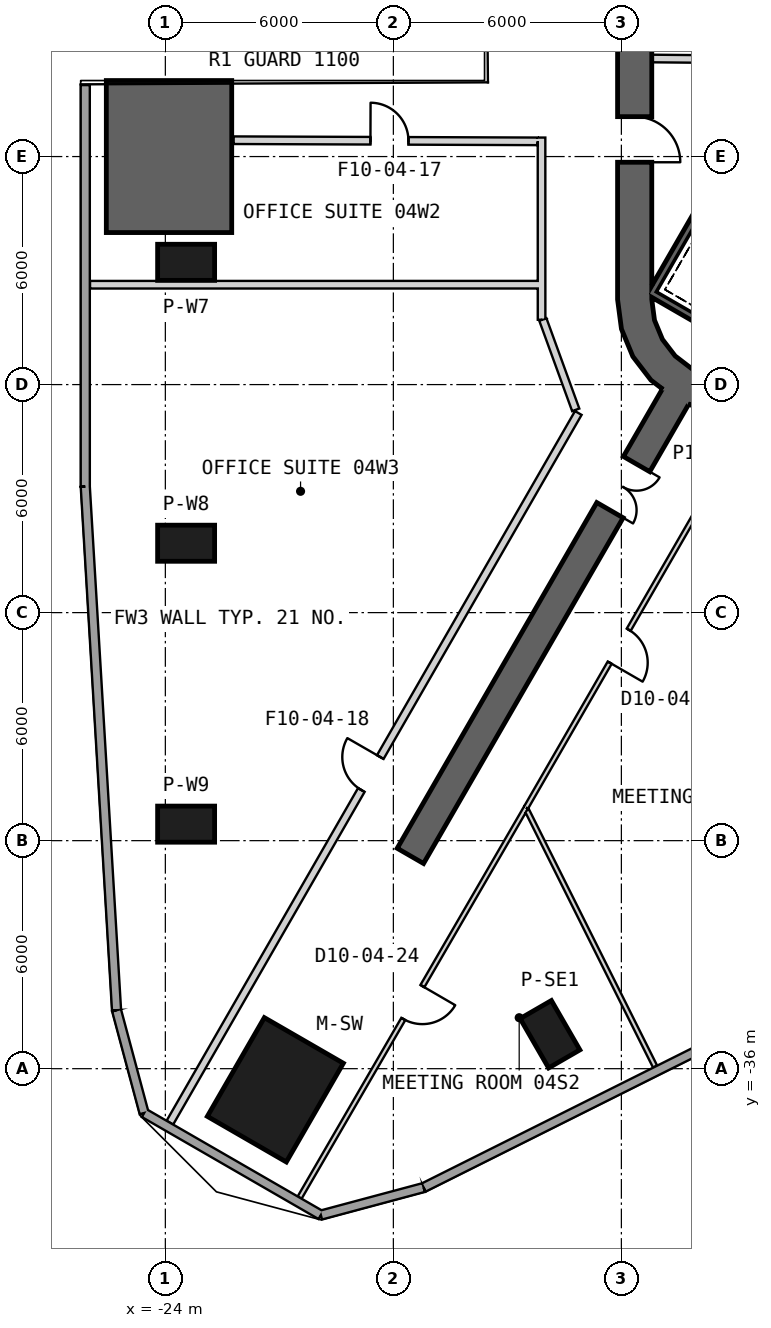
"""IFC4 building model, lengths in metres.
Left out: names, types, materials, properties, quantities, classifications, styles, units other than length and angle.
Written with IfcOpenShell. Run it as: python <this file> out.ifc"""

import sys

from ifc_helpers import new_model, si_unit, direction, frame, frame_2d, origin, origin_2d, place, context, subcontext, project, spatial, polyline, rectangle, outline, extrude, element, fill, save


model = new_model("IFC4")
c1 = context("Model", 3, precision=1e-05, world=origin(), true_north=direction((0.0, 1.0)))
c2 = subcontext(c1, "Body", "Model", "MODEL_VIEW")
j1 = project(units=[si_unit("LENGTHUNIT", "METRE"), si_unit("PLANEANGLEUNIT", "RADIAN")], contexts=[c1])
p1 = place(None, origin())
s1 = spatial("IfcSite", under=j1, at=p1, CompositionType="ELEMENT")
p2 = place(p1, origin())
s2 = spatial("IfcBuilding", under=s1, at=p2, CompositionType="ELEMENT")
p3 = place(p2, frame((0.0, 0.0, 27.5)))
s3 = spatial("IfcBuildingStorey", under=s2, at=p3, CompositionType="ELEMENT", Elevation=27.5)
p4 = place(p3, frame((-21.106, -36.556, 0.0), z_axis=(0.0, 0.0, 1.0), x_axis=(-0.5, -0.866025403784, 0.0)))
e1 = element("IfcColumn", 1, at=p4, inside=s3, PredefinedType="COLUMN", context=c2, shape_type="SweptSolid", body=[
    extrude(rectangle(XDim=3.0, YDim=2.4, at=origin_2d()), origin(), (0.0, 0.0, 1.0), 6.0),
])
for number, where, z_axis, x_axis in (
    (2, (-23.453, -14.783, 0.0), (0.0, 0.0, 1.0), (-1.0, 0.0, 0.0)),
    (3, (-23.453, -22.174, 0.0), (0.0, 0.0, 1.0), (-1.0, 0.0, 0.0)),
    (4, (-23.453, -29.566, 0.0), (0.0, 0.0, 1.0), (-1.0, 0.0, 0.0)),
    (5, (-13.878, -35.094, 0.0), (0.0, 0.0, 1.0), (0.5, -0.866, 0.0)),
):
    element("IfcColumn", number, at=place(p3, frame(where, z_axis=z_axis, x_axis=x_axis)), inside=s3, PredefinedType="COLUMN", context=c2, shape_type="SweptSolid", body=[
        extrude(rectangle(XDim=1.5, YDim=0.95, at=origin_2d()), origin(), (0.0, 0.0, 1.0), 6.0),
    ])
p5 = place(p3, frame((-11.65, 15.762, 0.0), z_axis=(0.0, 0.0, 1.0), x_axis=(0.0, -1.0, 0.0)))
e6 = element("IfcWall", 6, at=p5, inside=s3, PredefinedType="SHEAR", context=c2, shape_type="SweptSolid", body=[
    extrude(rectangle(XDim=31.523, YDim=0.9, at=frame_2d((15.762, 0.0))), origin(), (0.0, 0.0, 1.0), 6.0),
])
p6 = place(p5, frame((7.062, 0.0, 0.0)))
e7 = element("IfcOpeningElement", 7, at=p6, cuts=e6, PredefinedType="OPENING", context=c2, shape_type="SweptSolid", body=[
    extrude(rectangle(XDim=1.2, YDim=2.4, at=frame_2d((0.6, 1.2))), frame((0.0, 0.46, 0.0), z_axis=(0.0, -1.0, 0.0), x_axis=(1.0, 0.0, 0.0)), (0.0, 0.0, 1.0), 0.92),
])
p7 = place(p5, frame((9.762, 0.0, 0.0)))
e8 = element("IfcOpeningElement", 8, at=p7, cuts=e6, PredefinedType="OPENING", context=c2, shape_type="SweptSolid", body=[
    extrude(rectangle(XDim=1.2, YDim=2.4, at=frame_2d((0.6, 1.2))), frame((0.0, 0.46, 0.0), z_axis=(0.0, -1.0, 0.0), x_axis=(1.0, 0.0, 0.0)), (0.0, 0.0, 1.0), 0.92),
])
p8 = place(p5, frame((12.462, 0.0, 0.0)))
e9 = element("IfcOpeningElement", 9, at=p8, cuts=e6, PredefinedType="OPENING", context=c2, shape_type="SweptSolid", body=[
    extrude(rectangle(XDim=1.2, YDim=2.4, at=frame_2d((0.6, 1.2))), frame((0.0, 0.46, 0.0), z_axis=(0.0, -1.0, 0.0), x_axis=(1.0, 0.0, 0.0)), (0.0, 0.0, 1.0), 0.92),
])
p9 = place(p5, frame((15.162, 0.0, 0.0)))
e10 = element("IfcOpeningElement", 10, at=p9, cuts=e6, PredefinedType="OPENING", context=c2, shape_type="SweptSolid", body=[
    extrude(rectangle(XDim=1.2, YDim=2.4, at=frame_2d((0.6, 1.2))), frame((0.0, 0.46, 0.0), z_axis=(0.0, -1.0, 0.0), x_axis=(1.0, 0.0, 0.0)), (0.0, 0.0, 1.0), 0.92),
])
p10 = place(p5, frame((17.862, 0.0, 0.0)))
e11 = element("IfcOpeningElement", 11, at=p10, cuts=e6, PredefinedType="OPENING", context=c2, shape_type="SweptSolid", body=[
    extrude(rectangle(XDim=1.2, YDim=2.4, at=frame_2d((0.6, 1.2))), frame((0.0, 0.46, 0.0), z_axis=(0.0, -1.0, 0.0), x_axis=(1.0, 0.0, 0.0)), (0.0, 0.0, 1.0), 0.92),
])
p11 = place(p5, frame((20.562, 0.0, 0.0)))
e12 = element("IfcOpeningElement", 12, at=p11, cuts=e6, PredefinedType="OPENING", context=c2, shape_type="SweptSolid", body=[
    extrude(rectangle(XDim=1.2, YDim=2.4, at=frame_2d((0.6, 1.2))), frame((0.0, 0.46, 0.0), z_axis=(0.0, -1.0, 0.0), x_axis=(1.0, 0.0, 0.0)), (0.0, 0.0, 1.0), 0.92),
])
p12 = place(p5, frame((23.262, 0.0, 0.0)))
e13 = element("IfcOpeningElement", 13, at=p12, cuts=e6, PredefinedType="OPENING", context=c2, shape_type="SweptSolid", body=[
    extrude(rectangle(XDim=1.2, YDim=2.4, at=frame_2d((0.6, 1.2))), frame((0.0, 0.46, 0.0), z_axis=(0.0, -1.0, 0.0), x_axis=(1.0, 0.0, 0.0)), (0.0, 0.0, 1.0), 0.92),
])
p13 = place(p5, frame((3.612, 0.0, 0.0)))
e14 = element("IfcOpeningElement", 14, at=p13, cuts=e6, PredefinedType="OPENING", context=c2, shape_type="SweptSolid", body=[
    extrude(rectangle(XDim=1.2, YDim=2.4, at=frame_2d((0.6, 1.2))), frame((0.0, 0.46, 0.0), z_axis=(0.0, -1.0, 0.0), x_axis=(1.0, 0.0, 0.0)), (0.0, 0.0, 1.0), 0.92),
])
p14 = place(p5, frame((26.712, 0.0, 0.0)))
e15 = element("IfcOpeningElement", 15, at=p14, cuts=e6, PredefinedType="OPENING", context=c2, shape_type="SweptSolid", body=[
    extrude(rectangle(XDim=1.2, YDim=2.4, at=frame_2d((0.6, 1.2))), frame((0.0, 0.46, 0.0), z_axis=(0.0, -1.0, 0.0), x_axis=(1.0, 0.0, 0.0)), (0.0, 0.0, 1.0), 0.92),
])
p15 = place(p3, origin())
e16 = element("IfcWall", 16, at=p15, inside=s3, PredefinedType="SHEAR", context=c2, shape_type="SweptSolid", body=[
    extrude(outline(polyline([(-12.1, -15.762), (-11.998, -16.538), (-11.698, -17.262), (-11.221, -17.883), (-10.6, -18.36), (-9.876, -18.659), (-9.1, -18.762), (-8.323, -18.659), (-7.6, -18.36), (-8.05, -17.58), (-8.556, -17.79), (-9.1, -17.862), (-9.644, -17.79), (-10.15, -17.58), (-10.585, -17.247), (-10.919, -16.812), (-11.128, -16.305), (-11.2, -15.762), (-12.1, -15.762)])), origin(), (0.0, 0.0, 1.0), 6.0),
])
p16 = place(p3, frame((-10.575, -18.316, 0.0), z_axis=(0.0, 0.0, 1.0), x_axis=(-0.499996575515, -0.866027380903, 0.0)))
e17 = element("IfcWall", 17, at=p16, inside=s3, PredefinedType="SHEAR", context=c2, shape_type="SweptSolid", body=[
    extrude(rectangle(XDim=13.954, YDim=0.8, at=frame_2d((6.977, 0.0))), origin(), (0.0, 0.0, 1.0), 6.0),
])
p17 = place(p16, frame((2.05, 0.0, 0.0)))
e18 = element("IfcOpeningElement", 18, at=p17, cuts=e17, PredefinedType="OPENING", context=c2, shape_type="SweptSolid", body=[
    extrude(rectangle(XDim=1.4, YDim=2.4, at=frame_2d((0.7, 1.2))), frame((0.0, 0.41, 0.0), z_axis=(0.0, -1.0, 0.0), x_axis=(1.0, 0.0, 0.0)), (0.0, 0.0, 1.0), 0.82),
])
p18 = place(p3, origin())
e19 = element("IfcWall", 19, at=p18, inside=s3, PredefinedType="SHEAR", context=c2, shape_type="SweptSolid", body=[
    extrude(outline(polyline([(-25.553, -10.0), (-25.553, -14.0), (-22.253, -14.0), (-22.253, -10.0), (-25.553, -10.0)])), origin(), (0.0, 0.0, 1.0), 6.0),
])
p19 = place(p3, frame((-26.108, -10.119, 0.0), z_axis=(0.0, 0.0, 1.0), x_axis=(6.9319284e-05, -0.999999997597, 0.0)))
e20 = element("IfcWall", 20, at=p19, inside=s3, PredefinedType="SOLIDWALL", context=c2, shape_type="SweptSolid", body=[
    extrude(rectangle(XDim=10.566, YDim=0.24, at=frame_2d((5.283, 0.0))), origin(), (0.0, 0.0, 1.0), 5.7),
])
p20 = place(p3, frame((-26.107, -20.685, 0.0), z_axis=(0.0, 0.0, 1.0), x_axis=(0.059596169304, -0.998222568671, 0.0)))
e21 = element("IfcWall", 21, at=p20, inside=s3, PredefinedType="SOLIDWALL", context=c2, shape_type="SweptSolid", body=[
    extrude(rectangle(XDim=13.801, YDim=0.24, at=frame_2d((6.901, 0.0))), origin(), (0.0, 0.0, 1.0), 5.7),
])
p21 = place(p3, frame((-25.284, -34.462, 0.0), z_axis=(0.0, 0.0, 1.0), x_axis=(0.258850842196, -0.965917305723, 0.0)))
e22 = element("IfcWall", 22, at=p21, inside=s3, PredefinedType="SOLIDWALL", context=c2, shape_type="SweptSolid", body=[
    extrude(rectangle(XDim=2.8, YDim=0.24, at=frame_2d((1.4, 0.0))), origin(), (0.0, 0.0, 1.0), 5.7),
])
p22 = place(p3, frame((-24.56, -37.167, 0.0), z_axis=(0.0, 0.0, 1.0), x_axis=(0.866010734295, -0.500025407441, 0.0)))
e23 = element("IfcWall", 23, at=p22, inside=s3, PredefinedType="SOLIDWALL", context=c2, shape_type="SweptSolid", body=[
    extrude(rectangle(XDim=5.371, YDim=0.24, at=frame_2d((2.686, 0.0))), origin(), (0.0, 0.0, 1.0), 5.7),
])
p23 = place(p3, frame((-19.908, -39.853, 0.0), z_axis=(0.0, 0.0, 1.0), x_axis=(0.965923146675, 0.25882904535, 0.0)))
e24 = element("IfcWall", 24, at=p23, inside=s3, PredefinedType="SOLIDWALL", context=c2, shape_type="SweptSolid", body=[
    extrude(rectangle(XDim=2.801, YDim=0.24, at=frame_2d((1.4, 0.0))), origin(), (0.0, 0.0, 1.0), 5.7),
])
p24 = place(p3, frame((-17.203, -39.128, 0.0), z_axis=(0.0, 0.0, 1.0), x_axis=(0.894377655106, 0.447312653573, 0.0)))
e25 = element("IfcWall", 25, at=p24, inside=s3, PredefinedType="SOLIDWALL", context=c2, shape_type="SweptSolid", body=[
    extrude(rectangle(XDim=13.802, YDim=0.24, at=frame_2d((6.901, 0.0))), origin(), (0.0, 0.0, 1.0), 5.7),
])
p25 = place(p3, frame((-8.05, -9.449, 0.0), z_axis=(0.0, 0.0, 1.0), x_axis=(-0.999957467379, 0.009222983926, 0.0)))
e26 = element("IfcWall", 26, at=p25, inside=s3, PredefinedType="PLUMBINGWALL", context=c2, shape_type="SweptSolid", body=[
    extrude(rectangle(XDim=3.15, YDim=0.2, at=frame_2d((1.575, 0.0))), origin(), (0.0, 0.0, 1.0), 5.7),
])
p26 = place(p3, frame((-11.282, -15.541, -0.3), z_axis=(0.0, 0.0, 1.0), x_axis=(0.866000578957, -0.500042995397, 0.0)))
e27 = element("IfcWall", 27, at=p26, inside=s3, PredefinedType="SHEAR", context=c2, shape_type="SweptSolid", body=[
    extrude(rectangle(XDim=1.89, YDim=0.2, at=frame_2d((0.945, 0.0))), origin(), (0.0, 0.0, 1.0), 6.0),
])
p27 = place(p3, frame((-7.196, -8.663, -0.3), z_axis=(0.0, 0.0, 1.0), x_axis=(-0.499997992926, -0.866026562566, 0.0)))
e28 = element("IfcWall", 28, at=p27, inside=s3, PredefinedType="SHEAR", context=c2, shape_type="SweptSolid", body=[
    extrude(rectangle(XDim=7.9, YDim=0.2, at=frame_2d((3.95, 0.0))), origin(), (0.0, 0.0, 1.0), 6.0),
])
p28 = place(p3, frame((-14.101, -11.5, 0.0), z_axis=(0.0, 0.0, 1.0), x_axis=(0.000254660275, -0.999999967574, 0.0)))
e29 = element("IfcWall", 29, at=p28, inside=s3, PredefinedType="PARTITIONING", context=c2, shape_type="SweptSolid", body=[
    extrude(rectangle(XDim=4.793, YDim=0.2, at=frame_2d((2.397, 0.0))), origin(), (0.0, 0.0, 1.0), 4.88),
])
p29 = place(p3, frame((-22.203, -11.57, 0.0), z_axis=(0.0, 0.0, 1.0), x_axis=(0.999993072975, -0.003722096437, 0.0)))
e30 = element("IfcWall", 30, at=p29, inside=s3, PredefinedType="PARTITIONING", context=c2, shape_type="SweptSolid", body=[
    extrude(rectangle(XDim=8.002, YDim=0.2, at=frame_2d((4.001, 0.0))), origin(), (0.0, 0.0, 1.0), 5.17),
])
p30 = place(p29, frame((3.6, 0.0, 0.0)))
e31 = element("IfcOpeningElement", 31, at=p30, cuts=e30, PredefinedType="OPENING", context=c2, shape_type="SweptSolid", body=[
    extrude(rectangle(XDim=1.0, YDim=2.1, at=frame_2d((0.5, 1.05))), frame((0.0, 0.11, 0.0), z_axis=(0.0, -1.0, 0.0), x_axis=(1.0, 0.0, 0.0)), (0.0, 0.0, 1.0), 0.22),
])
p31 = place(p3, frame((-23.881, -37.42, 0.0), z_axis=(0.0, 0.0, 1.0), x_axis=(0.498838330943, 0.866695055704, 0.0)))
e32 = element("IfcWall", 32, at=p31, inside=s3, PredefinedType="PARTITIONING", context=c2, shape_type="SweptSolid", body=[
    extrude(rectangle(XDim=21.545, YDim=0.2, at=frame_2d((10.772, 0.0))), origin(), (0.0, 0.0, 1.0), 5.7),
])
p32 = place(p31, frame((10.099, 0.0, 0.0)))
e33 = element("IfcOpeningElement", 33, at=p32, cuts=e32, PredefinedType="OPENING", context=c2, shape_type="SweptSolid", body=[
    extrude(rectangle(XDim=1.0, YDim=2.1, at=frame_2d((0.5, 1.05))), frame((0.0, 0.11, 0.0), z_axis=(0.0, -1.0, 0.0), x_axis=(1.0, 0.0, 0.0)), (0.0, 0.0, 1.0), 0.22),
])
p33 = place(p3, frame((-14.066, -16.288, 0.0), z_axis=(0.0, 0.0, 1.0), x_axis=(0.34185155067, -0.939753966368, 0.0)))
e34 = element("IfcWall", 34, at=p33, inside=s3, PredefinedType="PARTITIONING", context=c2, shape_type="SweptSolid", body=[
    extrude(rectangle(XDim=2.53, YDim=0.2, at=frame_2d((1.265, 0.0))), origin(), (0.0, 0.0, 1.0), 4.78),
])
p34 = place(p3, frame((-14.2, -15.372, 0.0), z_axis=(0.0, 0.0, 1.0), x_axis=(-0.999999998068, -6.2161994e-05, 0.0)))
e35 = element("IfcWall", 35, at=p34, inside=s3, PredefinedType="PARTITIONING", context=c2, shape_type="SweptSolid", body=[
    extrude(rectangle(XDim=11.782, YDim=0.2, at=frame_2d((5.891, 0.0))), origin(), (0.0, 0.0, 1.0), 4.88),
])
p35 = place(p3, frame((-14.509, -29.13, 0.0), z_axis=(0.0, 0.0, 1.0), x_axis=(-0.502061062741, -0.864832174054, 0.0)))
e36 = element("IfcWall", 36, at=p35, inside=s3, PredefinedType="PARTITIONING", context=c2, shape_type="SweptSolid", body=[
    extrude(rectangle(XDim=11.866, YDim=0.12, at=frame_2d((5.933, 0.0))), origin(), (0.0, 0.0, 1.0), 5.7),
])
p36 = place(p35, frame((5.432, 0.0, 0.0)))
e37 = element("IfcOpeningElement", 37, at=p36, cuts=e36, PredefinedType="OPENING", context=c2, shape_type="SweptSolid", body=[
    extrude(rectangle(XDim=1.0, YDim=2.1, at=frame_2d((0.5, 1.05))), frame((0.0, 0.07, 0.0), z_axis=(0.0, -1.0, 0.0), x_axis=(1.0, 0.0, 0.0)), (0.0, 0.0, 1.0), 0.14),
])
p37 = place(p3, frame((-9.731, -20.855, 0.0), z_axis=(0.0, 0.0, 1.0), x_axis=(-0.500000422144, -0.866025160059, 0.0)))
e38 = element("IfcWall", 38, at=p37, inside=s3, PredefinedType="PARTITIONING", context=c2, shape_type="SweptSolid", body=[
    extrude(rectangle(XDim=9.554, YDim=0.12, at=frame_2d((4.777, 0.0))), origin(), (0.0, 0.0, 1.0), 5.7),
])
p38 = place(p37, frame((4.152, 0.0, 0.0)))
e39 = element("IfcOpeningElement", 39, at=p38, cuts=e38, PredefinedType="OPENING", context=c2, shape_type="SweptSolid", body=[
    extrude(rectangle(XDim=1.0, YDim=2.1, at=frame_2d((0.5, 1.05))), frame((0.0, 0.07, 0.0), z_axis=(0.0, -1.0, 0.0), x_axis=(1.0, 0.0, 0.0)), (0.0, 0.0, 1.0), 0.14),
])
p39 = place(p3, frame((-14.483, -29.206, 0.0), z_axis=(0.0, 0.0, 1.0), x_axis=(0.447291377977, -0.894388295533, 0.0)))
e40 = element("IfcWall", 40, at=p39, inside=s3, PredefinedType="PARTITIONING", context=c2, shape_type="SweptSolid", body=[
    extrude(rectangle(XDim=7.533, YDim=0.12, at=frame_2d((3.767, 0.0))), origin(), (0.0, 0.0, 1.0), 4.78),
])
p40 = place(p30, origin())
e41 = element("IfcDoor", 41, at=p40, inside=s3, OperationType="SINGLE_SWING_LEFT", PredefinedType="USERDEFINED", context=c2, shape_type="SweptSolid", body=[
    extrude(rectangle(XDim=1.0, YDim=2.1, at=frame_2d((0.5, 1.05))), frame((0.0, 0.025, 0.0), z_axis=(0.0, -1.0, 0.0), x_axis=(1.0, 0.0, 0.0)), (0.0, 0.0, 1.0), 0.05),
])
fill(e31, e41)
p41 = place(p32, origin())
e42 = element("IfcDoor", 42, at=p41, inside=s3, OperationType="SINGLE_SWING_RIGHT", PredefinedType="USERDEFINED", context=c2, shape_type="SweptSolid", body=[
    extrude(rectangle(XDim=1.0, YDim=2.1, at=frame_2d((0.5, 1.05))), frame((0.0, 0.025, 0.0), z_axis=(0.0, -1.0, 0.0), x_axis=(1.0, 0.0, 0.0)), (0.0, 0.0, 1.0), 0.05),
])
fill(e33, e42)
p42 = place(p36, origin())
e43 = element("IfcDoor", 43, at=p42, inside=s3, OperationType="SINGLE_SWING_LEFT", PredefinedType="NOTDEFINED", context=c2, shape_type="SweptSolid", body=[
    extrude(rectangle(XDim=1.0, YDim=2.1, at=frame_2d((0.5, 1.05))), frame((0.0, 0.025, 0.0), z_axis=(0.0, -1.0, 0.0), x_axis=(1.0, 0.0, 0.0)), (0.0, 0.0, 1.0), 0.05),
])
fill(e37, e43)
p43 = place(p38, origin())
e44 = element("IfcDoor", 44, at=p43, inside=s3, OperationType="SINGLE_SWING_RIGHT", PredefinedType="NOTDEFINED", context=c2, shape_type="SweptSolid", body=[
    extrude(rectangle(XDim=1.0, YDim=2.1, at=frame_2d((0.5, 1.05))), frame((0.0, 0.025, 0.0), z_axis=(0.0, -1.0, 0.0), x_axis=(1.0, 0.0, 0.0)), (0.0, 0.0, 1.0), 0.05),
])
fill(e39, e44)
p44 = place(p14, origin())
e45 = element("IfcDoor", 45, at=p44, inside=s3, OperationType="SINGLE_SWING_RIGHT", PredefinedType="USERDEFINED", context=c2, shape_type="SweptSolid", body=[
    extrude(rectangle(XDim=1.2, YDim=2.4, at=frame_2d((0.6, 1.2))), frame((0.0, 0.025, 0.0), z_axis=(0.0, -1.0, 0.0), x_axis=(1.0, 0.0, 0.0)), (0.0, 0.0, 1.0), 0.05),
])
fill(e15, e45)
p45 = place(p17, origin())
e46 = element("IfcDoor", 46, at=p45, inside=s3, OperationType="DOUBLE_DOOR_SINGLE_SWING", PredefinedType="NOTDEFINED", context=c2, shape_type="SweptSolid", body=[
    extrude(rectangle(XDim=1.4, YDim=2.4, at=frame_2d((0.7, 1.2))), frame((0.0, 0.025, 0.0), z_axis=(0.0, -1.0, 0.0), x_axis=(1.0, 0.0, 0.0)), (0.0, 0.0, 1.0), 0.05),
])
fill(e18, e46)
save(model, sys.argv[1])
